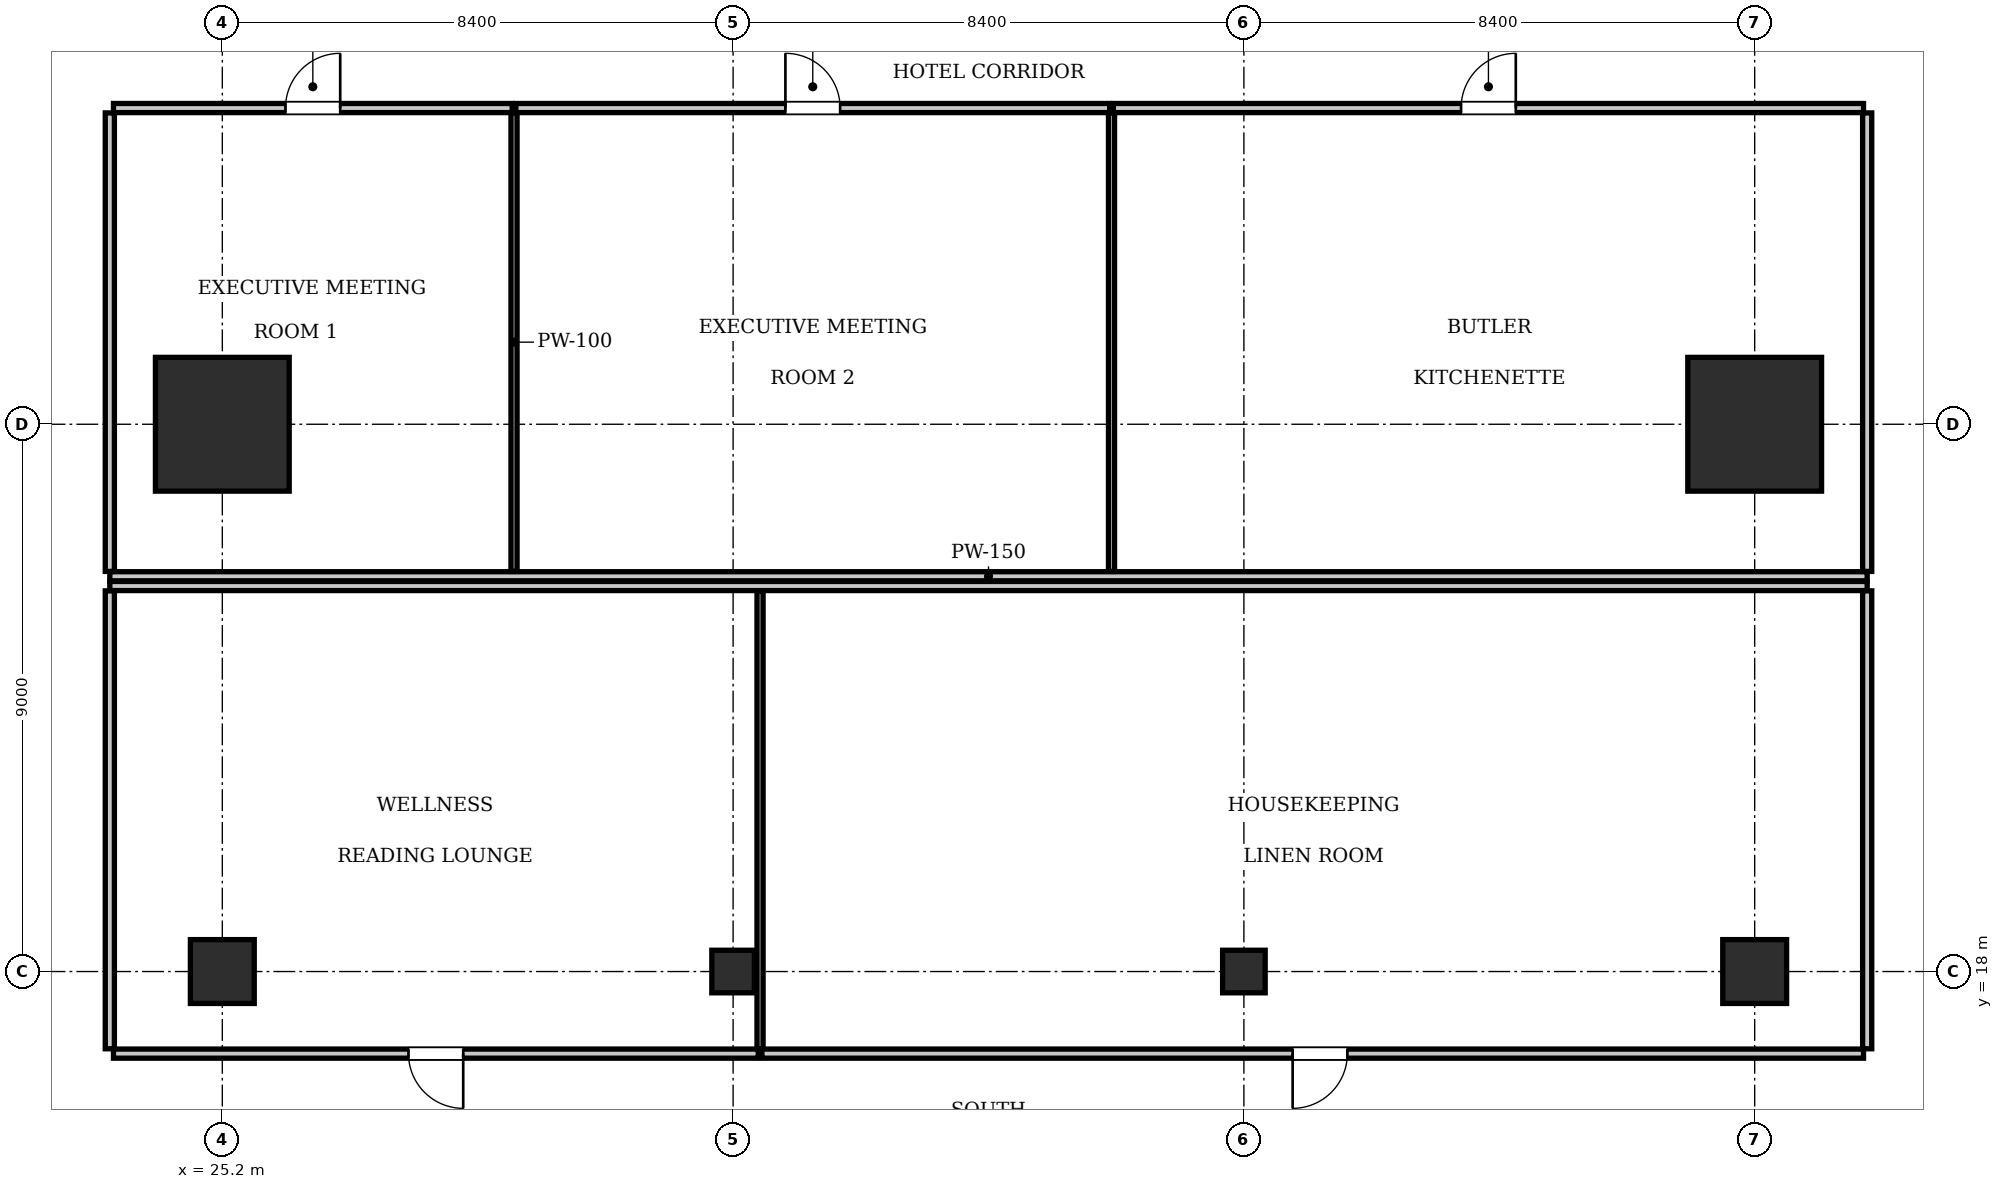
"""IFC4 building model, lengths in metres.
Left out: names, types, materials, properties, quantities, classifications, styles, units other than length and angle.
Written with IfcOpenShell. Run it as: python <this file> out.ifc"""

import sys

from ifc_helpers import new_model, si_unit, direction, frame, frame_2d, origin, origin_2d, place, context, subcontext, project, spatial, rectangle, i_section, extrude, element, fill, save


model = new_model("IFC4")
c1 = context("Model", 3, precision=1e-05, world=origin(), true_north=direction((0.0, 1.0)))
c2 = subcontext(c1, "Body", "Model", "MODEL_VIEW")
j1 = project(units=[si_unit("LENGTHUNIT", "METRE"), si_unit("PLANEANGLEUNIT", "RADIAN")], contexts=[c1])
p1 = place(None, origin())
s1 = spatial("IfcSite", under=j1, at=p1, CompositionType="ELEMENT")
p2 = place(p1, origin())
s2 = spatial("IfcBuilding", under=s1, at=p2, CompositionType="ELEMENT")
p3 = place(p2, frame((0.0, 0.0, 42.35)))
s3 = spatial("IfcBuildingStorey", under=s2, at=p3, CompositionType="ELEMENT", Elevation=42.35)
for number, where, z_axis, x_axis in (
    (1, (25.2, 27.0, 0.0), (0.0, 0.0, 1.0), (1.0, 0.0, 0.0)),
    (2, (50.4, 27.0, 0.0), (0.0, 0.0, 1.0), (1.0, 0.0, 0.0)),
):
    element("IfcColumn", number, at=place(p3, frame(where, z_axis=z_axis, x_axis=x_axis)), inside=s3, PredefinedType="COLUMN", context=c2, shape_type="SweptSolid", body=[
        extrude(rectangle(XDim=2.2, YDim=2.2, at=origin_2d()), origin(), (0.0, 0.0, 1.0), 3.85),
    ])
for number, where, z_axis, x_axis in (
    (3, (25.2, 18.0, 0.0), (0.0, 0.0, 1.0), (1.0, 0.0, 0.0)),
    (4, (50.4, 18.0, 0.0), (0.0, 0.0, 1.0), (1.0, 0.0, 0.0)),
):
    element("IfcColumn", number, at=place(p3, frame(where, z_axis=z_axis, x_axis=x_axis)), inside=s3, PredefinedType="COLUMN", context=c2, shape_type="SweptSolid", body=[
        extrude(rectangle(XDim=1.05, YDim=1.05, at=origin_2d()), origin(), (0.0, 0.0, 1.0), 3.85),
    ])
for number, where, z_axis, x_axis in (
    (5, (33.6, 18.0, 0.0), (0.0, 0.0, 1.0), (1.0, 0.0, 0.0)),
    (6, (42.0, 18.0, 0.0), (0.0, 0.0, 1.0), (1.0, 0.0, 0.0)),
):
    element("IfcColumn", number, at=place(p3, frame(where, z_axis=z_axis, x_axis=x_axis)), inside=s3, PredefinedType="COLUMN", context=c2, shape_type="SweptSolid", body=[
        extrude(i_section(OverallWidth=0.7, OverallDepth=0.7, WebThickness=0.028, FlangeThickness=0.044, at=origin_2d()), origin(), (0.0, 0.0, 1.0), 3.85),
    ])
p4 = place(p3, frame((23.35, 24.5, 0.0), z_axis=(0.0, 0.0, 1.0), x_axis=(1.0, 0.0, 0.0)))
e7 = element("IfcWall", 7, at=p4, inside=s3, PredefinedType="PARTITIONING", context=c2, shape_type="SweptSolid", body=[
    extrude(rectangle(XDim=28.9, YDim=0.15, at=frame_2d((14.45, 0.0))), origin(), (0.0, 0.0, 1.0), 3.61),
])
for number, where, z_axis, x_axis in (
    (8, (23.35, 24.58, 0.0), (0.0, 0.0, 1.0), (0.0, 1.0, 0.0)),
    (9, (52.25, 24.58, 0.0), (0.0, 0.0, 1.0), (0.0, 1.0, 0.0)),
):
    element("IfcWall", number, at=place(p3, frame(where, z_axis=z_axis, x_axis=x_axis)), inside=s3, PredefinedType="PARTITIONING", context=c2, shape_type="SweptSolid", body=[
        extrude(rectangle(XDim=7.54, YDim=0.15, at=frame_2d((3.77, 0.0))), origin(), (0.0, 0.0, 1.0), 3.61),
    ])
p5 = place(p3, frame((23.41, 32.2, 0.0), z_axis=(0.0, 0.0, 1.0), x_axis=(1.0, 0.0, 0.0)))
e10 = element("IfcWall", 10, at=p5, inside=s3, PredefinedType="PARTITIONING", context=c2, shape_type="SweptSolid", body=[
    extrude(rectangle(XDim=6.557, YDim=0.15, at=frame_2d((3.279, 0.0))), origin(), (0.0, 0.0, 1.0), 3.61),
])
p6 = place(p5, frame((2.829, 0.0, 0.0)))
e11 = element("IfcOpeningElement", 11, at=p6, cuts=e10, PredefinedType="OPENING", context=c2, shape_type="SweptSolid", body=[
    extrude(rectangle(XDim=0.9, YDim=2.1, at=frame_2d((0.45, 1.05))), frame((0.0, 0.085, 0.0), z_axis=(0.0, -1.0, 0.0), x_axis=(1.0, 0.0, 0.0)), (0.0, 0.0, 1.0), 0.17),
])
p7 = place(p3, frame((29.997, 24.58, 0.0), z_axis=(0.0, 0.0, 1.0), x_axis=(0.0, 1.0, 0.0)))
e12 = element("IfcWall", 12, at=p7, inside=s3, PredefinedType="PARTITIONING", context=c2, shape_type="SweptSolid", body=[
    extrude(rectangle(XDim=7.54, YDim=0.1, at=frame_2d((3.77, 0.0))), origin(), (0.0, 0.0, 1.0), 3.61),
])
p8 = place(p3, frame((30.027, 32.2, 0.0), z_axis=(0.0, 0.0, 1.0), x_axis=(1.0, 0.0, 0.0)))
e13 = element("IfcWall", 13, at=p8, inside=s3, PredefinedType="PARTITIONING", context=c2, shape_type="SweptSolid", body=[
    extrude(rectangle(XDim=9.766, YDim=0.15, at=frame_2d((4.883, 0.0))), origin(), (0.0, 0.0, 1.0), 3.61),
])
p9 = place(p8, frame((4.433, 0.0, 0.0)))
e14 = element("IfcOpeningElement", 14, at=p9, cuts=e13, PredefinedType="OPENING", context=c2, shape_type="SweptSolid", body=[
    extrude(rectangle(XDim=0.9, YDim=2.1, at=frame_2d((0.45, 1.05))), frame((0.0, 0.085, 0.0), z_axis=(0.0, -1.0, 0.0), x_axis=(1.0, 0.0, 0.0)), (0.0, 0.0, 1.0), 0.17),
])
p10 = place(p3, frame((39.823, 24.58, 0.0), z_axis=(0.0, 0.0, 1.0), x_axis=(0.0, 1.0, 0.0)))
e15 = element("IfcWall", 15, at=p10, inside=s3, PredefinedType="PARTITIONING", context=c2, shape_type="SweptSolid", body=[
    extrude(rectangle(XDim=7.54, YDim=0.1, at=frame_2d((3.77, 0.0))), origin(), (0.0, 0.0, 1.0), 3.61),
])
p11 = place(p3, frame((39.853, 32.2, 0.0), z_axis=(0.0, 0.0, 1.0), x_axis=(1.0, 0.0, 0.0)))
e16 = element("IfcWall", 16, at=p11, inside=s3, PredefinedType="PARTITIONING", context=c2, shape_type="SweptSolid", body=[
    extrude(rectangle(XDim=12.337, YDim=0.15, at=frame_2d((6.168, 0.0))), origin(), (0.0, 0.0, 1.0), 3.61),
])
p12 = place(p11, frame((5.719, 0.0, 0.0)))
e17 = element("IfcOpeningElement", 17, at=p12, cuts=e16, PredefinedType="OPENING", context=c2, shape_type="SweptSolid", body=[
    extrude(rectangle(XDim=0.9, YDim=2.1, at=frame_2d((0.45, 1.05))), frame((0.0, 0.085, 0.0), z_axis=(0.0, -1.0, 0.0), x_axis=(1.0, 0.0, 0.0)), (0.0, 0.0, 1.0), 0.17),
])
p13 = place(p3, frame((23.35, 24.34, 0.0), z_axis=(0.0, 0.0, 1.0), x_axis=(1.0, 0.0, 0.0)))
e18 = element("IfcWall", 18, at=p13, inside=s3, PredefinedType="PARTITIONING", context=c2, shape_type="SweptSolid", body=[
    extrude(rectangle(XDim=28.9, YDim=0.15, at=frame_2d((14.45, 0.0))), origin(), (0.0, 0.0, 1.0), 3.61),
])
for number, where, z_axis, x_axis in (
    (19, (23.35, 16.73, 0.0), (0.0, 0.0, 1.0), (0.0, 1.0, 0.0)),
    (20, (52.25, 16.73, 0.0), (0.0, 0.0, 1.0), (0.0, 1.0, 0.0)),
):
    element("IfcWall", number, at=place(p3, frame(where, z_axis=z_axis, x_axis=x_axis)), inside=s3, PredefinedType="PARTITIONING", context=c2, shape_type="SweptSolid", body=[
        extrude(rectangle(XDim=7.53, YDim=0.15, at=frame_2d((3.765, 0.0))), origin(), (0.0, 0.0, 1.0), 3.61),
    ])
p14 = place(p3, frame((23.41, 16.65, 0.0), z_axis=(0.0, 0.0, 1.0), x_axis=(1.0, 0.0, 0.0)))
e21 = element("IfcWall", 21, at=p14, inside=s3, PredefinedType="PARTITIONING", context=c2, shape_type="SweptSolid", body=[
    extrude(rectangle(XDim=10.603, YDim=0.15, at=frame_2d((5.302, 0.0))), origin(), (0.0, 0.0, 1.0), 3.61),
])
p15 = place(p14, frame((4.852, 0.0, 0.0)))
e22 = element("IfcOpeningElement", 22, at=p15, cuts=e21, PredefinedType="OPENING", context=c2, shape_type="SweptSolid", body=[
    extrude(rectangle(XDim=0.9, YDim=2.1, at=frame_2d((0.45, 1.05))), frame((0.0, 0.085, 0.0), z_axis=(0.0, -1.0, 0.0), x_axis=(1.0, 0.0, 0.0)), (0.0, 0.0, 1.0), 0.17),
])
p16 = place(p3, frame((34.043, 16.73, 0.0), z_axis=(0.0, 0.0, 1.0), x_axis=(0.0, 1.0, 0.0)))
e23 = element("IfcWall", 23, at=p16, inside=s3, PredefinedType="PARTITIONING", context=c2, shape_type="SweptSolid", body=[
    extrude(rectangle(XDim=7.53, YDim=0.1, at=frame_2d((3.765, 0.0))), origin(), (0.0, 0.0, 1.0), 3.61),
])
p17 = place(p3, frame((34.073, 16.65, 0.0), z_axis=(0.0, 0.0, 1.0), x_axis=(1.0, 0.0, 0.0)))
e24 = element("IfcWall", 24, at=p17, inside=s3, PredefinedType="PARTITIONING", context=c2, shape_type="SweptSolid", body=[
    extrude(rectangle(XDim=18.117, YDim=0.15, at=frame_2d((9.059, 0.0))), origin(), (0.0, 0.0, 1.0), 3.61),
])
p18 = place(p17, frame((8.729, 0.0, 0.0)))
e25 = element("IfcOpeningElement", 25, at=p18, cuts=e24, PredefinedType="OPENING", context=c2, shape_type="SweptSolid", body=[
    extrude(rectangle(XDim=0.9, YDim=2.1, at=frame_2d((0.45, 1.05))), frame((0.0, 0.085, 0.0), z_axis=(0.0, -1.0, 0.0), x_axis=(1.0, 0.0, 0.0)), (0.0, 0.0, 1.0), 0.17),
])
p19 = place(p6, origin())
e26 = element("IfcDoor", 26, at=p19, inside=s3, OperationType="SINGLE_SWING_RIGHT", PredefinedType="DOOR", context=c2, shape_type="SweptSolid", body=[
    extrude(rectangle(XDim=0.9, YDim=2.1, at=frame_2d((0.45, 1.05))), frame((0.0, 0.025, 0.0), z_axis=(0.0, -1.0, 0.0), x_axis=(1.0, 0.0, 0.0)), (0.0, 0.0, 1.0), 0.05),
])
fill(e11, e26)
p20 = place(p9, origin())
e27 = element("IfcDoor", 27, at=p20, inside=s3, OperationType="SINGLE_SWING_LEFT", PredefinedType="DOOR", context=c2, shape_type="SweptSolid", body=[
    extrude(rectangle(XDim=0.9, YDim=2.1, at=frame_2d((0.45, 1.05))), frame((0.0, 0.025, 0.0), z_axis=(0.0, -1.0, 0.0), x_axis=(1.0, 0.0, 0.0)), (0.0, 0.0, 1.0), 0.05),
])
fill(e14, e27)
p21 = place(p12, origin())
e28 = element("IfcDoor", 28, at=p21, inside=s3, OperationType="SINGLE_SWING_RIGHT", PredefinedType="DOOR", context=c2, shape_type="SweptSolid", body=[
    extrude(rectangle(XDim=0.9, YDim=2.1, at=frame_2d((0.45, 1.05))), frame((0.0, 0.025, 0.0), z_axis=(0.0, -1.0, 0.0), x_axis=(1.0, 0.0, 0.0)), (0.0, 0.0, 1.0), 0.05),
])
fill(e17, e28)
p22 = place(p15, frame((0.9, 0.0, 0.0), z_axis=(0.0, 0.0, 1.0), x_axis=(-1.0, 0.0, 0.0)))
e29 = element("IfcDoor", 29, at=p22, inside=s3, OperationType="SINGLE_SWING_LEFT", PredefinedType="DOOR", context=c2, shape_type="SweptSolid", body=[
    extrude(rectangle(XDim=0.9, YDim=2.1, at=frame_2d((0.45, 1.05))), frame((0.0, 0.025, 0.0), z_axis=(0.0, -1.0, 0.0), x_axis=(1.0, 0.0, 0.0)), (0.0, 0.0, 1.0), 0.05),
])
fill(e22, e29)
p23 = place(p18, frame((0.9, 0.0, 0.0), z_axis=(0.0, 0.0, 1.0), x_axis=(-1.0, 0.0, 0.0)))
e30 = element("IfcDoor", 30, at=p23, inside=s3, OperationType="SINGLE_SWING_RIGHT", PredefinedType="DOOR", context=c2, shape_type="SweptSolid", body=[
    extrude(rectangle(XDim=0.9, YDim=2.1, at=frame_2d((0.45, 1.05))), frame((0.0, 0.025, 0.0), z_axis=(0.0, -1.0, 0.0), x_axis=(1.0, 0.0, 0.0)), (0.0, 0.0, 1.0), 0.05),
])
fill(e25, e30)
save(model, sys.argv[1])
